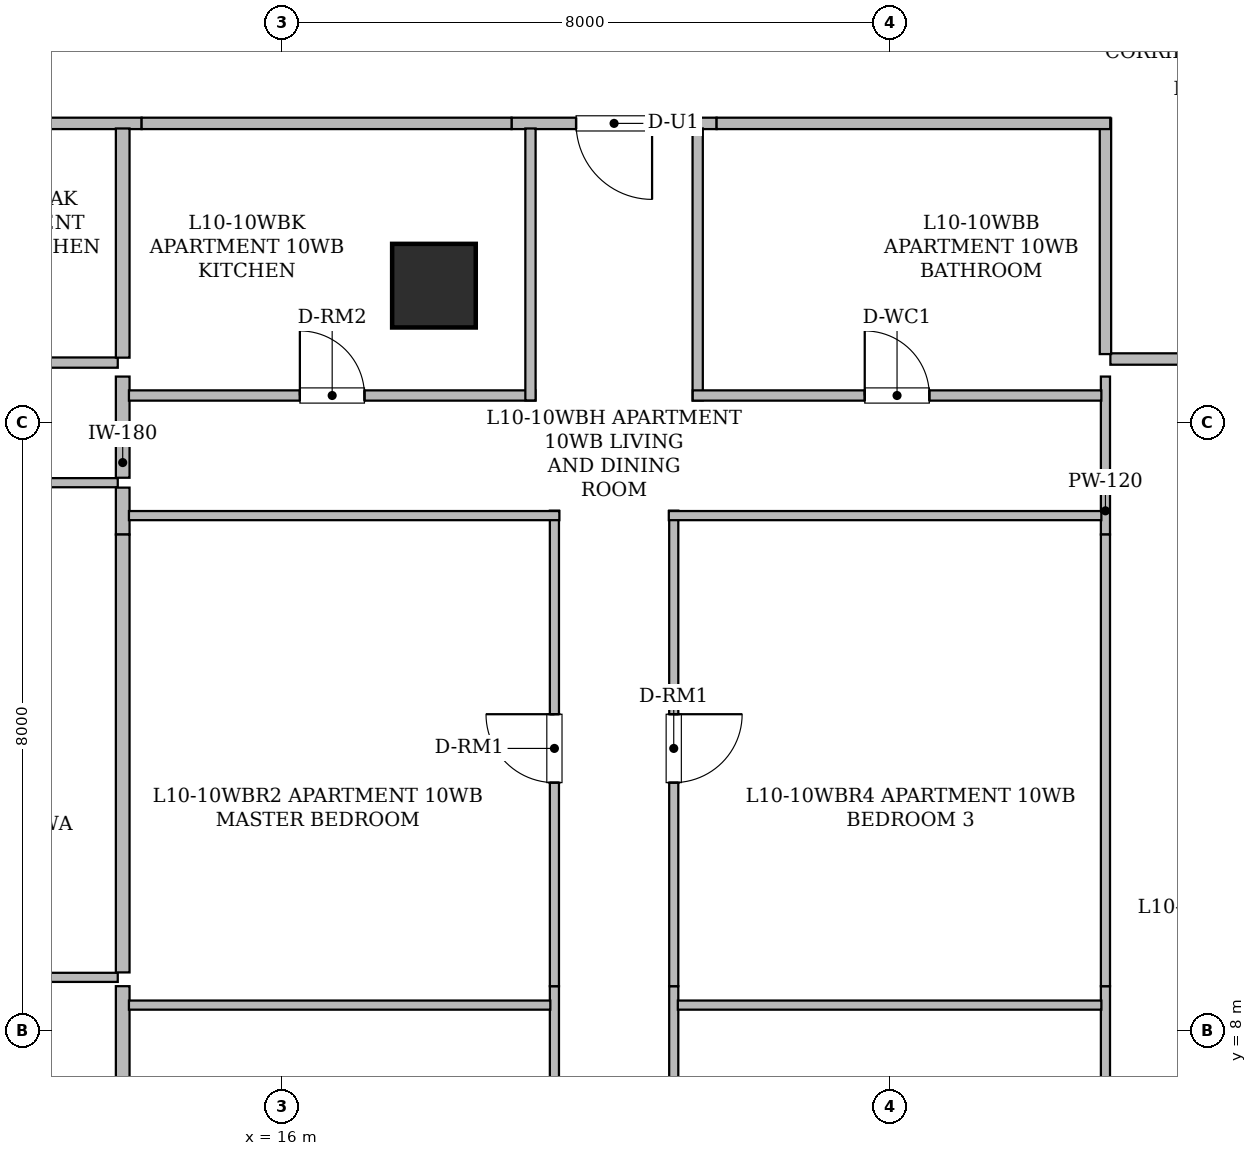
"""IFC4 building model, lengths in metres.
Left out: names, types, materials, properties, quantities, classifications, styles, units other than length and angle.
Written with IfcOpenShell. Run it as: python <this file> out.ifc"""

import sys

from ifc_helpers import new_model, si_unit, direction, frame, frame_2d, origin, origin_2d, place, context, subcontext, project, spatial, rectangle, hollow_rectangle, extrude, element, fill, save


model = new_model("IFC4")
c1 = context("Model", 3, precision=1e-05, world=origin(), true_north=direction((0.0, 1.0)))
c2 = subcontext(c1, "Body", "Model", "MODEL_VIEW")
j1 = project(units=[si_unit("LENGTHUNIT", "METRE"), si_unit("PLANEANGLEUNIT", "RADIAN")], contexts=[c1])
p1 = place(None, origin())
s1 = spatial("IfcSite", under=j1, at=p1, CompositionType="ELEMENT")
p2 = place(p1, origin())
s2 = spatial("IfcBuilding", under=s1, at=p2, CompositionType="ELEMENT")
p3 = place(p2, frame((0.0, 0.0, 44.25)))
s3 = spatial("IfcBuildingStorey", under=s2, at=p3, CompositionType="ELEMENT", Elevation=44.25)
p4 = place(p3, frame((18.0, 17.8, 0.0), z_axis=(0.0, 0.0, 1.0), x_axis=(1.0, 0.0, 0.0)))
e1 = element("IfcColumn", 1, at=p4, inside=s3, PredefinedType="COLUMN", context=c2, shape_type="SweptSolid", body=[
    extrude(hollow_rectangle(XDim=1.1, YDim=1.1, WallThickness=0.055, at=origin_2d()), origin(), (0.0, 0.0, 1.0), 3.65),
])
p5 = place(p3, frame((34.114, 16.835, 0.0), z_axis=(0.0, 0.0, 1.0), x_axis=(-1.0, 0.0, 0.0)))
e2 = element("IfcWall", 2, at=p5, inside=s3, PredefinedType="STANDARD", context=c2, shape_type="SweptSolid", body=[
    extrude(rectangle(XDim=7.214, YDim=0.15, at=frame_2d((3.607, 0.0))), origin(), (0.0, 0.0, 1.0), 2.647),
])
p6 = place(p5, frame((3.053, 0.0, 0.0)))
e3 = element("IfcOpeningElement", 3, at=p6, cuts=e2, PredefinedType="OPENING", context=c2, shape_type="SweptSolid", body=[
    extrude(rectangle(XDim=1.15, YDim=2.2, at=frame_2d((0.575, 1.1))), frame((0.0, 0.085, 0.0), z_axis=(0.0, -1.0, 0.0), x_axis=(1.0, 0.0, 0.0)), (0.0, 0.0, 1.0), 0.17),
])
p7 = place(p3, frame((14.154, 19.935, 0.0), z_axis=(0.0, 0.0, 1.0), x_axis=(-1.0, 0.0, 0.0)))
e4 = element("IfcWall", 4, at=p7, inside=s3, PredefinedType="STANDARD", context=c2, shape_type="SweptSolid", body=[
    extrude(rectangle(XDim=3.83, YDim=0.15, at=frame_2d((1.915, 0.0))), origin(), (0.0, 0.0, 1.0), 3.43),
])
p8 = place(p3, frame((21.719, 19.935, 0.0), z_axis=(0.0, 0.0, 1.0), x_axis=(-1.0, 0.0, 0.0)))
e5 = element("IfcWall", 5, at=p8, inside=s3, PredefinedType="STANDARD", context=c2, shape_type="SweptSolid", body=[
    extrude(rectangle(XDim=2.698, YDim=0.15, at=frame_2d((1.349, 0.0))), origin(), (0.0, 0.0, 1.0), 3.43),
])
p9 = place(p8, frame((0.849, 0.0, 0.0)))
e6 = element("IfcOpeningElement", 6, at=p9, cuts=e5, PredefinedType="OPENING", context=c2, shape_type="SweptSolid", body=[
    extrude(rectangle(XDim=1.0, YDim=2.15, at=frame_2d((0.5, 1.075))), frame((0.0, 0.085, 0.0), z_axis=(0.0, -1.0, 0.0), x_axis=(1.0, 0.0, 0.0)), (0.0, 0.0, 1.0), 0.17),
])
p10 = place(p3, frame((26.835, 16.9, 0.0), z_axis=(0.0, 0.0, 1.0), x_axis=(0.0, 1.0, 0.0)))
e7 = element("IfcWall", 7, at=p10, inside=s3, PredefinedType="STANDARD", context=c2, shape_type="SweptSolid", body=[
    extrude(rectangle(XDim=3.1, YDim=0.15, at=frame_2d((1.55, 0.0))), origin(), (0.0, 0.0, 1.0), 2.647),
])
p11 = place(p3, frame((26.898, 19.935, 0.0), z_axis=(0.0, 0.0, 1.0), x_axis=(-1.0, 0.0, 0.0)))
e8 = element("IfcWall", 8, at=p11, inside=s3, PredefinedType="STANDARD", context=c2, shape_type="SweptSolid", body=[
    extrude(rectangle(XDim=5.179, YDim=0.15, at=frame_2d((2.589, 0.0))), origin(), (0.0, 0.0, 1.0), 3.43),
])
p12 = place(p3, frame((19.021, 19.935, 0.0), z_axis=(0.0, 0.0, 1.0), x_axis=(-1.0, 0.0, 0.0)))
e9 = element("IfcWall", 9, at=p12, inside=s3, PredefinedType="STANDARD", context=c2, shape_type="SweptSolid", body=[
    extrude(rectangle(XDim=4.867, YDim=0.15, at=frame_2d((2.434, 0.0))), origin(), (0.0, 0.0, 1.0), 2.647),
])
p13 = place(p3, frame((26.835, 14.526, 0.0), z_axis=(0.0, 0.0, 1.0), x_axis=(0.0, 1.0, 0.0)))
e10 = element("IfcWall", 10, at=p13, inside=s3, PredefinedType="PARTITIONING", context=c2, shape_type="SweptSolid", body=[
    extrude(rectangle(XDim=2.078, YDim=0.12, at=frame_2d((1.039, 0.0))), origin(), (0.0, 0.0, 1.0), 3.43),
])
p14 = place(p3, frame((26.835, 3.212, 0.0), z_axis=(0.0, 0.0, 1.0), x_axis=(0.0, 1.0, 0.0)))
e11 = element("IfcWall", 11, at=p14, inside=s3, PredefinedType="PARTITIONING", context=c2, shape_type="SweptSolid", body=[
    extrude(rectangle(XDim=5.372, YDim=0.12, at=frame_2d((2.686, 0.0))), origin(), (0.0, 0.0, 1.0), 2.803),
])
p15 = place(p3, frame((26.835, 8.584, 0.0), z_axis=(0.0, 0.0, 1.0), x_axis=(0.0, 1.0, 0.0)))
e12 = element("IfcWall", 12, at=p15, inside=s3, PredefinedType="PARTITIONING", context=c2, shape_type="SweptSolid", body=[
    extrude(rectangle(XDim=5.942, YDim=0.12, at=frame_2d((2.971, 0.0))), origin(), (0.0, 0.0, 1.0), 3.43),
])
p16 = place(p3, frame((10.01, 16.788, 0.0), z_axis=(0.0, 0.0, 1.0), x_axis=(1.0, 0.0, 0.0)))
e13 = element("IfcWall", 13, at=p16, inside=s3, PredefinedType="PARTITIONING", context=c2, shape_type="SweptSolid", body=[
    extrude(rectangle(XDim=3.83, YDim=0.135, at=frame_2d((1.915, 0.0))), origin(), (0.0, 0.0, 1.0), 2.647),
])
p17 = place(p16, frame((1.49, 0.0, 0.0)))
e14 = element("IfcOpeningElement", 14, at=p17, cuts=e13, PredefinedType="OPENING", context=c2, shape_type="SweptSolid", body=[
    extrude(rectangle(XDim=0.85, YDim=2.1, at=frame_2d((0.425, 1.05))), frame((0.0, 0.077, 0.0), z_axis=(0.0, -1.0, 0.0), x_axis=(1.0, 0.0, 0.0)), (0.0, 0.0, 1.0), 0.155),
])
p18 = place(p3, frame((13.84, 15.208, 0.0), z_axis=(0.0, 0.0, 1.0), x_axis=(-1.0, 0.0, 0.0)))
e15 = element("IfcWall", 15, at=p18, inside=s3, PredefinedType="PARTITIONING", context=c2, shape_type="SweptSolid", body=[
    extrude(rectangle(XDim=4.145, YDim=0.12, at=frame_2d((2.073, 0.0))), origin(), (0.0, 0.0, 1.0), 3.43),
])
p19 = place(p3, frame((13.905, 16.604, 0.0), z_axis=(0.0, 0.0, 1.0), x_axis=(0.0, -1.0, 0.0)))
e16 = element("IfcWall", 16, at=p19, inside=s3, PredefinedType="STANDARD", context=c2, shape_type="SweptSolid", body=[
    extrude(rectangle(XDim=1.331, YDim=0.18, at=frame_2d((0.666, 0.0))), origin(), (0.0, 0.0, 1.0), 3.43),
])
p20 = place(p3, frame((13.905, 19.868, 0.0), z_axis=(0.0, 0.0, 1.0), x_axis=(0.0, -1.0, 0.0)))
e17 = element("IfcWall", 17, at=p20, inside=s3, PredefinedType="STANDARD", context=c2, shape_type="SweptSolid", body=[
    extrude(rectangle(XDim=3.015, YDim=0.18, at=frame_2d((1.507, 0.0))), origin(), (0.0, 0.0, 1.0), 2.647),
])
p21 = place(p3, frame((9.814, 8.7, 0.0), z_axis=(0.0, 0.0, 1.0), x_axis=(1.0, 0.0, 0.0)))
e18 = element("IfcWall", 18, at=p21, inside=s3, PredefinedType="PARTITIONING", context=c2, shape_type="SweptSolid", body=[
    extrude(rectangle(XDim=4.026, YDim=0.12, at=frame_2d((2.013, 0.0))), origin(), (0.0, 0.0, 1.0), 2.647),
])
p22 = place(p3, frame((13.905, 8.584, 0.0), z_axis=(0.0, 0.0, 1.0), x_axis=(0.0, -1.0, 0.0)))
e19 = element("IfcWall", 19, at=p22, inside=s3, PredefinedType="STANDARD", context=c2, shape_type="SweptSolid", body=[
    extrude(rectangle(XDim=5.372, YDim=0.18, at=frame_2d((2.686, 0.0))), origin(), (0.0, 0.0, 1.0), 2.803),
])
p23 = place(p3, frame((13.905, 15.143, 0.0), z_axis=(0.0, 0.0, 1.0), x_axis=(0.0, -1.0, 0.0)))
e20 = element("IfcWall", 20, at=p23, inside=s3, PredefinedType="STANDARD", context=c2, shape_type="SweptSolid", body=[
    extrude(rectangle(XDim=0.617, YDim=0.18, at=frame_2d((0.309, 0.0))), origin(), (0.0, 0.0, 1.0), 3.43),
])
p24 = place(p3, frame((13.905, 14.526, 0.0), z_axis=(0.0, 0.0, 1.0), x_axis=(0.0, -1.0, 0.0)))
e21 = element("IfcWall", 21, at=p24, inside=s3, PredefinedType="STANDARD", context=c2, shape_type="SweptSolid", body=[
    extrude(rectangle(XDim=5.761, YDim=0.18, at=frame_2d((2.88, 0.0))), origin(), (0.0, 0.0, 1.0), 2.647),
])
p25 = place(p3, frame((21.47, 19.868, 0.0), z_axis=(0.0, 0.0, 1.0), x_axis=(0.0, -1.0, 0.0)))
e22 = element("IfcWall", 22, at=p25, inside=s3, PredefinedType="PARTITIONING", context=c2, shape_type="SweptSolid", body=[
    extrude(rectangle(XDim=3.578, YDim=0.135, at=frame_2d((1.789, 0.0))), origin(), (0.0, 0.0, 1.0), 2.647),
])
p26 = place(p3, frame((21.405, 16.355, 0.0), z_axis=(0.0, 0.0, 1.0), x_axis=(1.0, 0.0, 0.0)))
e23 = element("IfcWall", 23, at=p26, inside=s3, PredefinedType="PARTITIONING", context=c2, shape_type="SweptSolid", body=[
    extrude(rectangle(XDim=5.376, YDim=0.135, at=frame_2d((2.688, 0.0))), origin(), (0.0, 0.0, 1.0), 3.43),
])
p27 = place(p26, frame((2.263, 0.0, 0.0)))
e24 = element("IfcOpeningElement", 24, at=p27, cuts=e23, PredefinedType="OPENING", context=c2, shape_type="SweptSolid", body=[
    extrude(rectangle(XDim=0.85, YDim=2.1, at=frame_2d((0.425, 1.05))), frame((0.0, 0.077, 0.0), z_axis=(0.0, -1.0, 0.0), x_axis=(1.0, 0.0, 0.0)), (0.0, 0.0, 1.0), 0.155),
])
p28 = place(p3, frame((13.987, 16.355, 0.0), z_axis=(0.0, 0.0, 1.0), x_axis=(1.0, 0.0, 0.0)))
e25 = element("IfcWall", 25, at=p28, inside=s3, PredefinedType="PARTITIONING", context=c2, shape_type="SweptSolid", body=[
    extrude(rectangle(XDim=5.348, YDim=0.135, at=frame_2d((2.674, 0.0))), origin(), (0.0, 0.0, 1.0), 2.647),
])
p29 = place(p28, frame((2.249, 0.0, 0.0)))
e26 = element("IfcOpeningElement", 26, at=p29, cuts=e25, PredefinedType="OPENING", context=c2, shape_type="SweptSolid", body=[
    extrude(rectangle(XDim=0.85, YDim=2.1, at=frame_2d((0.425, 1.05))), frame((0.0, 0.077, 0.0), z_axis=(0.0, -1.0, 0.0), x_axis=(1.0, 0.0, 0.0)), (0.0, 0.0, 1.0), 0.155),
])
p30 = place(p3, frame((19.27, 16.29, 0.0), z_axis=(0.0, 0.0, 1.0), x_axis=(0.0, 1.0, 0.0)))
e27 = element("IfcWall", 27, at=p30, inside=s3, PredefinedType="PARTITIONING", context=c2, shape_type="SweptSolid", body=[
    extrude(rectangle(XDim=3.578, YDim=0.135, at=frame_2d((1.789, 0.0))), origin(), (0.0, 0.0, 1.0), 2.647),
])
p31 = place(p3, frame((19.585, 3.212, 0.0), z_axis=(0.0, 0.0, 1.0), x_axis=(0.0, 1.0, 0.0)))
e28 = element("IfcWall", 28, at=p31, inside=s3, PredefinedType="PARTITIONING", context=c2, shape_type="SweptSolid", body=[
    extrude(rectangle(XDim=5.372, YDim=0.12, at=frame_2d((2.686, 0.0))), origin(), (0.0, 0.0, 1.0), 2.803),
])
p32 = place(p31, frame((2.711, 0.0, 0.0)))
e29 = element("IfcOpeningElement", 29, at=p32, cuts=e28, PredefinedType="OPENING", context=c2, shape_type="SweptSolid", body=[
    extrude(rectangle(XDim=0.9, YDim=2.1, at=frame_2d((0.45, 1.05))), frame((0.0, 0.07, 0.0), z_axis=(0.0, -1.0, 0.0), x_axis=(1.0, 0.0, 0.0)), (0.0, 0.0, 1.0), 0.14),
])
p33 = place(p3, frame((19.585, 8.584, 0.0), z_axis=(0.0, 0.0, 1.0), x_axis=(0.0, 1.0, 0.0)))
e30 = element("IfcWall", 30, at=p33, inside=s3, PredefinedType="PARTITIONING", context=c2, shape_type="SweptSolid", body=[
    extrude(rectangle(XDim=6.256, YDim=0.12, at=frame_2d((3.128, 0.0))), origin(), (0.0, 0.0, 1.0), 2.647),
])
p34 = place(p33, frame((2.678, 0.0, 0.0)))
e31 = element("IfcOpeningElement", 31, at=p34, cuts=e30, PredefinedType="OPENING", context=c2, shape_type="SweptSolid", body=[
    extrude(rectangle(XDim=0.9, YDim=2.1, at=frame_2d((0.45, 1.05))), frame((0.0, 0.07, 0.0), z_axis=(0.0, -1.0, 0.0), x_axis=(1.0, 0.0, 0.0)), (0.0, 0.0, 1.0), 0.14),
])
p35 = place(p3, frame((19.65, 14.775, 0.0), z_axis=(0.0, 0.0, 1.0), x_axis=(-1.0, 0.0, 0.0)))
e32 = element("IfcWall", 32, at=p35, inside=s3, PredefinedType="PARTITIONING", context=c2, shape_type="SweptSolid", body=[
    extrude(rectangle(XDim=5.663, YDim=0.12, at=frame_2d((2.832, 0.0))), origin(), (0.0, 0.0, 1.0), 2.647),
])
p36 = place(p3, frame((21.155, 8.584, 0.0), z_axis=(0.0, 0.0, 1.0), x_axis=(0.0, -1.0, 0.0)))
e33 = element("IfcWall", 33, at=p36, inside=s3, PredefinedType="PARTITIONING", context=c2, shape_type="SweptSolid", body=[
    extrude(rectangle(XDim=5.372, YDim=0.12, at=frame_2d((2.686, 0.0))), origin(), (0.0, 0.0, 1.0), 2.647),
])
p37 = place(p36, frame((1.761, 0.0, 0.0)))
e34 = element("IfcOpeningElement", 34, at=p37, cuts=e33, PredefinedType="OPENING", context=c2, shape_type="SweptSolid", body=[
    extrude(rectangle(XDim=0.9, YDim=2.1, at=frame_2d((0.45, 1.05))), frame((0.0, 0.07, 0.0), z_axis=(0.0, -1.0, 0.0), x_axis=(1.0, 0.0, 0.0)), (0.0, 0.0, 1.0), 0.14),
])
p38 = place(p3, frame((21.155, 14.84, 0.0), z_axis=(0.0, 0.0, 1.0), x_axis=(0.0, -1.0, 0.0)))
e35 = element("IfcWall", 35, at=p38, inside=s3, PredefinedType="PARTITIONING", context=c2, shape_type="SweptSolid", body=[
    extrude(rectangle(XDim=6.256, YDim=0.12, at=frame_2d((3.128, 0.0))), origin(), (0.0, 0.0, 1.0), 3.43),
])
p39 = place(p38, frame((2.678, 0.0, 0.0)))
e36 = element("IfcOpeningElement", 36, at=p39, cuts=e35, PredefinedType="OPENING", context=c2, shape_type="SweptSolid", body=[
    extrude(rectangle(XDim=0.9, YDim=2.1, at=frame_2d((0.45, 1.05))), frame((0.0, 0.07, 0.0), z_axis=(0.0, -1.0, 0.0), x_axis=(1.0, 0.0, 0.0)), (0.0, 0.0, 1.0), 0.14),
])
p40 = place(p3, frame((26.781, 14.775, 0.0), z_axis=(0.0, 0.0, 1.0), x_axis=(-1.0, 0.0, 0.0)))
e37 = element("IfcWall", 37, at=p40, inside=s3, PredefinedType="PARTITIONING", context=c2, shape_type="SweptSolid", body=[
    extrude(rectangle(XDim=5.691, YDim=0.12, at=frame_2d((2.845, 0.0))), origin(), (0.0, 0.0, 1.0), 3.43),
])
p41 = place(p3, frame((13.987, 8.335, 0.0), z_axis=(0.0, 0.0, 1.0), x_axis=(1.0, 0.0, 0.0)))
e38 = element("IfcWall", 38, at=p41, inside=s3, PredefinedType="PARTITIONING", context=c2, shape_type="SweptSolid", body=[
    extrude(rectangle(XDim=5.544, YDim=0.12, at=frame_2d((2.772, 0.0))), origin(), (0.0, 0.0, 1.0), 3.43),
])
p42 = place(p3, frame((21.209, 8.335, 0.0), z_axis=(0.0, 0.0, 1.0), x_axis=(1.0, 0.0, 0.0)))
e39 = element("IfcWall", 39, at=p42, inside=s3, PredefinedType="PARTITIONING", context=c2, shape_type="SweptSolid", body=[
    extrude(rectangle(XDim=5.572, YDim=0.12, at=frame_2d((2.786, 0.0))), origin(), (0.0, 0.0, 1.0), 3.43),
])
p43 = place(p9, origin())
e40 = element("IfcDoor", 40, at=p43, inside=s3, OperationType="SINGLE_SWING_LEFT", PredefinedType="DOOR", context=c2, shape_type="SweptSolid", body=[
    extrude(rectangle(XDim=1.0, YDim=2.15, at=frame_2d((0.5, 1.075))), frame((0.0, 0.025, 0.0), z_axis=(0.0, -1.0, 0.0), x_axis=(1.0, 0.0, 0.0)), (0.0, 0.0, 1.0), 0.05),
])
fill(e6, e40)
p44 = place(p27, origin())
e41 = element("IfcDoor", 41, at=p44, inside=s3, OperationType="SINGLE_SWING_LEFT", PredefinedType="DOOR", context=c2, shape_type="SweptSolid", body=[
    extrude(rectangle(XDim=0.85, YDim=2.1, at=frame_2d((0.425, 1.05))), frame((0.0, 0.025, 0.0), z_axis=(0.0, -1.0, 0.0), x_axis=(1.0, 0.0, 0.0)), (0.0, 0.0, 1.0), 0.05),
])
fill(e24, e41)
p45 = place(p29, origin())
e42 = element("IfcDoor", 42, at=p45, inside=s3, OperationType="SINGLE_SWING_LEFT", PredefinedType="DOOR", context=c2, shape_type="SweptSolid", body=[
    extrude(rectangle(XDim=0.85, YDim=2.1, at=frame_2d((0.425, 1.05))), frame((0.0, 0.025, 0.0), z_axis=(0.0, -1.0, 0.0), x_axis=(1.0, 0.0, 0.0)), (0.0, 0.0, 1.0), 0.05),
])
fill(e26, e42)
p46 = place(p34, origin())
e43 = element("IfcDoor", 43, at=p46, inside=s3, OperationType="SINGLE_SWING_RIGHT", PredefinedType="DOOR", context=c2, shape_type="SweptSolid", body=[
    extrude(rectangle(XDim=0.9, YDim=2.1, at=frame_2d((0.45, 1.05))), frame((0.0, 0.025, 0.0), z_axis=(0.0, -1.0, 0.0), x_axis=(1.0, 0.0, 0.0)), (0.0, 0.0, 1.0), 0.05),
])
fill(e31, e43)
p47 = place(p39, origin())
e44 = element("IfcDoor", 44, at=p47, inside=s3, OperationType="SINGLE_SWING_LEFT", PredefinedType="DOOR", context=c2, shape_type="SweptSolid", body=[
    extrude(rectangle(XDim=0.9, YDim=2.1, at=frame_2d((0.45, 1.05))), frame((0.0, 0.025, 0.0), z_axis=(0.0, -1.0, 0.0), x_axis=(1.0, 0.0, 0.0)), (0.0, 0.0, 1.0), 0.05),
])
fill(e36, e44)
save(model, sys.argv[1])
